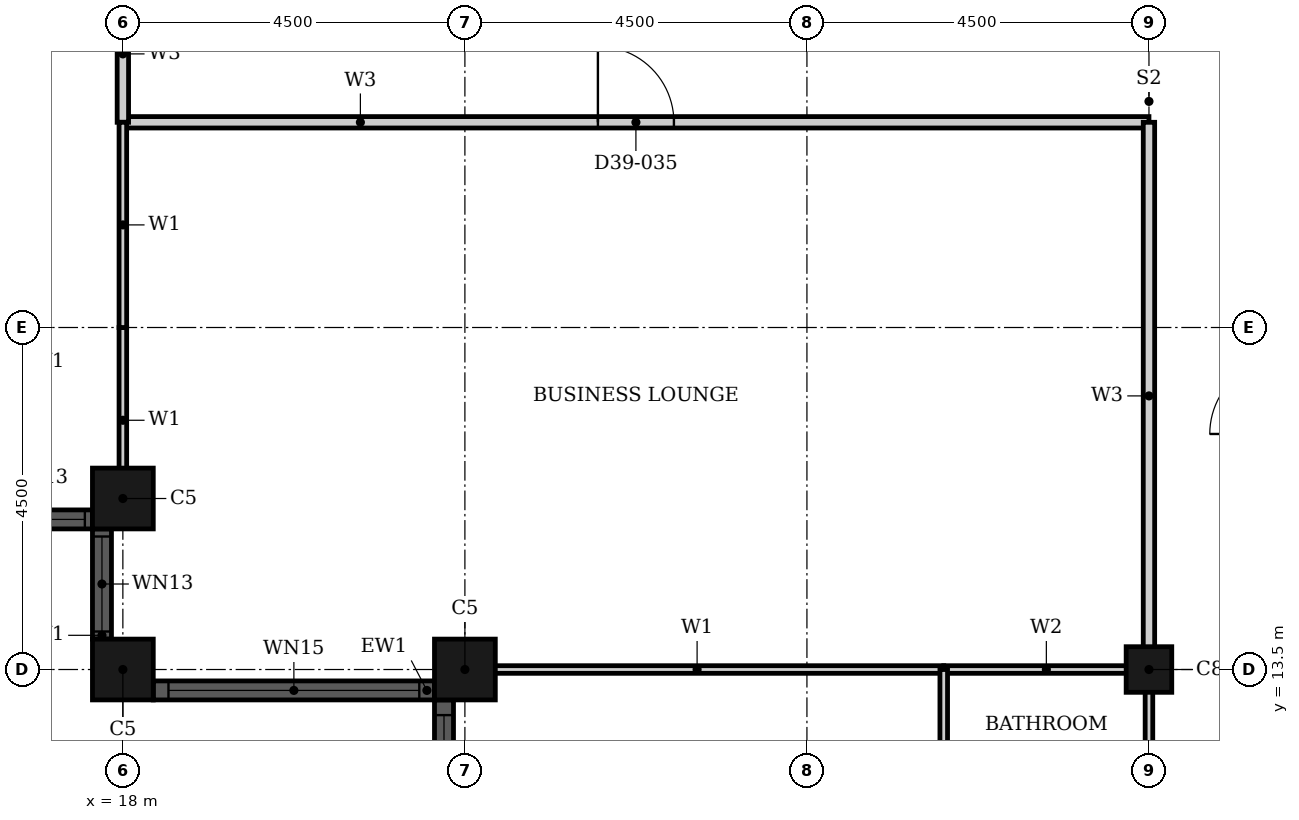
"""IFC4 building model, lengths in metres.
Left out: names, types, materials, properties, quantities, classifications, styles, units other than length and angle.
Written with IfcOpenShell. Run it as: python <this file> out.ifc"""

import sys

from ifc_helpers import new_model, si_unit, direction, frame, frame_2d, origin, origin_2d, place, context, subcontext, project, spatial, rectangle, hollow_rectangle, extrude, element, fill, save


model = new_model("IFC4")
c1 = context("Model", 3, precision=1e-05, world=origin(), true_north=direction((0.0, 1.0)))
c2 = subcontext(c1, "Body", "Model", "MODEL_VIEW")
j1 = project(units=[si_unit("LENGTHUNIT", "METRE"), si_unit("PLANEANGLEUNIT", "RADIAN")], contexts=[c1])
p1 = place(None, origin())
s1 = spatial("IfcSite", under=j1, at=p1, CompositionType="ELEMENT")
p2 = place(p1, origin())
s2 = spatial("IfcBuilding", under=s1, at=p2, CompositionType="ELEMENT")
p3 = place(p2, frame((0.0, 0.0, 158.0)))
s3 = spatial("IfcBuildingStorey", under=s2, at=p3, CompositionType="ELEMENT", Elevation=158.0)
for number, where, z_axis, x_axis in (
    (1, (18.0, 15.75, 0.0), (0.0, 0.0, 1.0), (1.0, 0.0, 0.0)),
    (2, (18.0, 13.5, 0.0), (0.0, 0.0, 1.0), (1.0, 0.0, 0.0)),
    (3, (22.5, 13.5, 0.0), (0.0, 0.0, 1.0), (1.0, 0.0, 0.0)),
):
    element("IfcColumn", number, at=place(p3, frame(where, z_axis=z_axis, x_axis=x_axis)), inside=s3, PredefinedType="COLUMN", context=c2, shape_type="SweptSolid", body=[
        extrude(hollow_rectangle(XDim=0.8, YDim=0.8, WallThickness=0.025, at=origin_2d()), origin(), (0.0, 0.0, 1.0), 3.7),
    ])
p4 = place(p3, frame((31.5, 13.5, 0.0), z_axis=(0.0, 0.0, 1.0), x_axis=(1.0, 0.0, 0.0)))
e4 = element("IfcColumn", 4, at=p4, inside=s3, PredefinedType="COLUMN", context=c2, shape_type="SweptSolid", body=[
    extrude(hollow_rectangle(XDim=0.6, YDim=0.6, WallThickness=0.02, at=origin_2d()), origin(), (0.0, 0.0, 1.0), 3.7),
])
p5 = place(p3, frame((16.15, 15.475, 0.0), z_axis=(0.0, 0.0, 1.0), x_axis=(1.0, 0.0, 0.0)))
e5 = element("IfcWall", 5, at=p5, inside=s3, PredefinedType="SOLIDWALL", context=c2, shape_type="SweptSolid", body=[
    extrude(rectangle(XDim=1.45, YDim=0.25, at=frame_2d((0.725, 0.0))), origin(), (0.0, 0.0, 1.0), 3.7),
])
p6 = place(p5, frame((0.1, 0.0, 0.9)))
e6 = element("IfcOpeningElement", 6, at=p6, cuts=e5, PredefinedType="OPENING", context=c2, shape_type="SweptSolid", body=[
    extrude(rectangle(XDim=1.25, YDim=1.85, at=frame_2d((0.625, 0.925))), frame((0.0, 0.135, 0.0), z_axis=(0.0, -1.0, 0.0), x_axis=(1.0, 0.0, 0.0)), (0.0, 0.0, 1.0), 0.27),
])
p7 = place(p3, frame((17.725, 15.35, 0.0), z_axis=(0.0, 0.0, 1.0), x_axis=(0.0, -1.0, 0.0)))
e7 = element("IfcWall", 7, at=p7, inside=s3, PredefinedType="SOLIDWALL", context=c2, shape_type="SweptSolid", body=[
    extrude(rectangle(XDim=1.45, YDim=0.25, at=frame_2d((0.725, 0.0))), origin(), (0.0, 0.0, 1.0), 3.7),
])
p8 = place(p7, frame((0.1, 0.0, 0.9)))
e8 = element("IfcOpeningElement", 8, at=p8, cuts=e7, PredefinedType="OPENING", context=c2, shape_type="SweptSolid", body=[
    extrude(rectangle(XDim=1.25, YDim=1.85, at=frame_2d((0.625, 0.925))), frame((0.0, 0.135, 0.0), z_axis=(0.0, -1.0, 0.0), x_axis=(1.0, 0.0, 0.0)), (0.0, 0.0, 1.0), 0.27),
])
p9 = place(p3, frame((18.4, 13.225, 0.0), z_axis=(0.0, 0.0, 1.0), x_axis=(1.0, 0.0, 0.0)))
e9 = element("IfcWall", 9, at=p9, inside=s3, PredefinedType="SOLIDWALL", context=c2, shape_type="SweptSolid", body=[
    extrude(rectangle(XDim=3.7, YDim=0.25, at=frame_2d((1.85, 0.0))), origin(), (0.0, 0.0, 1.0), 3.7),
])
p10 = place(p9, frame((0.2, 0.0, 0.45)))
e10 = element("IfcOpeningElement", 10, at=p10, cuts=e9, PredefinedType="OPENING", context=c2, shape_type="SweptSolid", body=[
    extrude(rectangle(XDim=3.3, YDim=2.3, at=frame_2d((1.65, 1.15))), frame((0.0, 0.135, 0.0), z_axis=(0.0, -1.0, 0.0), x_axis=(1.0, 0.0, 0.0)), (0.0, 0.0, 1.0), 0.27),
])
p11 = place(p3, frame((22.225, 13.1, 0.0), z_axis=(0.0, 0.0, 1.0), x_axis=(0.0, -1.0, 0.0)))
e11 = element("IfcWall", 11, at=p11, inside=s3, PredefinedType="SOLIDWALL", context=c2, shape_type="SweptSolid", body=[
    extrude(rectangle(XDim=8.2, YDim=0.25, at=frame_2d((4.1, 0.0))), origin(), (0.0, 0.0, 1.0), 3.7),
])
p12 = place(p11, frame((0.2, 0.0, 0.45)))
e12 = element("IfcOpeningElement", 12, at=p12, cuts=e11, PredefinedType="OPENING", context=c2, shape_type="SweptSolid", body=[
    extrude(rectangle(XDim=3.3, YDim=2.3, at=frame_2d((1.65, 1.15))), frame((0.0, 0.135, 0.0), z_axis=(0.0, -1.0, 0.0), x_axis=(1.0, 0.0, 0.0)), (0.0, 0.0, 1.0), 0.27),
])
p13 = place(p11, frame((4.7, 0.0, 0.45)))
e13 = element("IfcOpeningElement", 13, at=p13, cuts=e11, PredefinedType="OPENING", context=c2, shape_type="SweptSolid", body=[
    extrude(rectangle(XDim=3.3, YDim=2.3, at=frame_2d((1.65, 1.15))), frame((0.0, 0.135, 0.0), z_axis=(0.0, -1.0, 0.0), x_axis=(1.0, 0.0, 0.0)), (0.0, 0.0, 1.0), 0.27),
])
p14 = place(p3, frame((18.0, 20.7, 0.0), z_axis=(0.0, 0.0, 1.0), x_axis=(1.0, 0.0, 0.0)))
e14 = element("IfcWall", 14, at=p14, inside=s3, PredefinedType="PARTITIONING", context=c2, shape_type="SweptSolid", body=[
    extrude(rectangle(XDim=13.5, YDim=0.15, at=frame_2d((6.75, 0.0))), origin(), (0.0, 0.0, 1.0), 3.4),
])
p15 = place(p14, frame((6.25, 0.0, 0.0)))
e15 = element("IfcOpeningElement", 15, at=p15, cuts=e14, PredefinedType="OPENING", context=c2, shape_type="SweptSolid", body=[
    extrude(rectangle(XDim=1.0, YDim=2.1, at=frame_2d((0.5, 1.05))), frame((0.0, 0.085, 0.0), z_axis=(0.0, -1.0, 0.0), x_axis=(1.0, 0.0, 0.0)), (0.0, 0.0, 1.0), 0.17),
])
p16 = place(p3, frame((18.0, 20.7, 0.0), z_axis=(0.0, 0.0, 1.0), x_axis=(0.0, 1.0, 0.0)))
e16 = element("IfcWall", 16, at=p16, inside=s3, PredefinedType="PARTITIONING", context=c2, shape_type="SweptSolid", body=[
    extrude(rectangle(XDim=1.8, YDim=0.15, at=frame_2d((0.9, 0.0))), origin(), (0.0, 0.0, 1.0), 3.4),
])
p17 = place(p3, frame((31.5, 13.5, 0.0), z_axis=(0.0, 0.0, 1.0), x_axis=(0.0, 1.0, 0.0)))
e17 = element("IfcWall", 17, at=p17, inside=s3, PredefinedType="PARTITIONING", context=c2, shape_type="SweptSolid", body=[
    extrude(rectangle(XDim=7.2, YDim=0.15, at=frame_2d((3.6, 0.0))), origin(), (0.0, 0.0, 1.0), 3.4),
])
p18 = place(p3, frame((22.31, 13.5, 0.0), z_axis=(0.0, 0.0, 1.0), x_axis=(1.0, 0.0, 0.0)))
e18 = element("IfcWall", 18, at=p18, inside=s3, PredefinedType="PARTITIONING", context=c2, shape_type="SweptSolid", body=[
    extrude(rectangle(XDim=6.49, YDim=0.1, at=frame_2d((3.245, 0.0))), origin(), (0.0, 0.0, 1.0), 2.48),
])
p19 = place(p3, frame((18.0, 15.56, 0.0), z_axis=(0.0, 0.0, 1.0), x_axis=(0.0, 1.0, 0.0)))
e19 = element("IfcWall", 19, at=p19, inside=s3, PredefinedType="PARTITIONING", context=c2, shape_type="SweptSolid", body=[
    extrude(rectangle(XDim=2.439, YDim=0.1, at=frame_2d((1.219, 0.0))), origin(), (0.0, 0.0, 1.0), 3.4),
])
p20 = place(p3, frame((18.0, 18.0, 0.0), z_axis=(0.0, 0.0, 1.0), x_axis=(0.0, 1.0, 0.0)))
e20 = element("IfcWall", 20, at=p20, inside=s3, PredefinedType="PARTITIONING", context=c2, shape_type="SweptSolid", body=[
    extrude(rectangle(XDim=2.7, YDim=0.1, at=frame_2d((1.35, 0.0))), origin(), (0.0, 0.0, 1.0), 3.4),
])
p21 = place(p3, frame((28.8, 13.5, 0.0), z_axis=(0.0, 0.0, 1.0), x_axis=(1.0, 0.0, 0.0)))
e21 = element("IfcWall", 21, at=p21, inside=s3, PredefinedType="PARTITIONING", context=c2, shape_type="SweptSolid", body=[
    extrude(rectangle(XDim=2.7, YDim=0.1, at=frame_2d((1.35, 0.0))), origin(), (0.0, 0.0, 1.0), 2.48),
])
p22 = place(p3, frame((28.8, 11.1, 0.0), z_axis=(0.0, 0.0, 1.0), x_axis=(0.0, 1.0, 0.0)))
e22 = element("IfcWall", 22, at=p22, inside=s3, PredefinedType="PARTITIONING", context=c2, shape_type="SweptSolid", body=[
    extrude(rectangle(XDim=2.4, YDim=0.1, at=frame_2d((1.2, 0.0))), origin(), (0.0, 0.0, 1.0), 3.4),
])
p23 = place(p3, frame((31.5, 11.1, 0.0), z_axis=(0.0, 0.0, 1.0), x_axis=(0.0, 1.0, 0.0)))
e23 = element("IfcWall", 23, at=p23, inside=s3, PredefinedType="PARTITIONING", context=c2, shape_type="SweptSolid", body=[
    extrude(rectangle(XDim=2.4, YDim=0.1, at=frame_2d((1.2, 0.0))), origin(), (0.0, 0.0, 1.0), 2.68),
])
p24 = place(p6, origin())
e24 = element("IfcWindow", 24, at=p24, inside=s3, PartitioningType="SINGLE_PANEL", PredefinedType="WINDOW", context=c2, shape_type="SweptSolid", body=[
    extrude(rectangle(XDim=1.25, YDim=1.85, at=frame_2d((0.625, 0.925))), frame((0.0, 0.03, 0.0), z_axis=(0.0, -1.0, 0.0), x_axis=(1.0, 0.0, 0.0)), (0.0, 0.0, 1.0), 0.06),
])
fill(e6, e24)
p25 = place(p8, origin())
e25 = element("IfcWindow", 25, at=p25, inside=s3, PartitioningType="SINGLE_PANEL", PredefinedType="WINDOW", context=c2, shape_type="SweptSolid", body=[
    extrude(rectangle(XDim=1.25, YDim=1.85, at=frame_2d((0.625, 0.925))), frame((0.0, 0.03, 0.0), z_axis=(0.0, -1.0, 0.0), x_axis=(1.0, 0.0, 0.0)), (0.0, 0.0, 1.0), 0.06),
])
fill(e8, e25)
p26 = place(p10, origin())
e26 = element("IfcWindow", 26, at=p26, inside=s3, PartitioningType="SINGLE_PANEL", PredefinedType="WINDOW", context=c2, shape_type="SweptSolid", body=[
    extrude(rectangle(XDim=3.3, YDim=2.3, at=frame_2d((1.65, 1.15))), frame((0.0, 0.03, 0.0), z_axis=(0.0, -1.0, 0.0), x_axis=(1.0, 0.0, 0.0)), (0.0, 0.0, 1.0), 0.06),
])
fill(e10, e26)
p27 = place(p12, origin())
e27 = element("IfcWindow", 27, at=p27, inside=s3, PartitioningType="SINGLE_PANEL", PredefinedType="WINDOW", context=c2, shape_type="SweptSolid", body=[
    extrude(rectangle(XDim=3.3, YDim=2.3, at=frame_2d((1.65, 1.15))), frame((0.0, 0.03, 0.0), z_axis=(0.0, -1.0, 0.0), x_axis=(1.0, 0.0, 0.0)), (0.0, 0.0, 1.0), 0.06),
])
fill(e12, e27)
p28 = place(p15, origin())
e28 = element("IfcDoor", 28, at=p28, inside=s3, OperationType="SINGLE_SWING_RIGHT", PredefinedType="DOOR", context=c2, shape_type="SweptSolid", body=[
    extrude(rectangle(XDim=1.0, YDim=2.1, at=frame_2d((0.5, 1.05))), frame((0.0, 0.025, 0.0), z_axis=(0.0, -1.0, 0.0), x_axis=(1.0, 0.0, 0.0)), (0.0, 0.0, 1.0), 0.05),
])
fill(e15, e28)
save(model, sys.argv[1])
